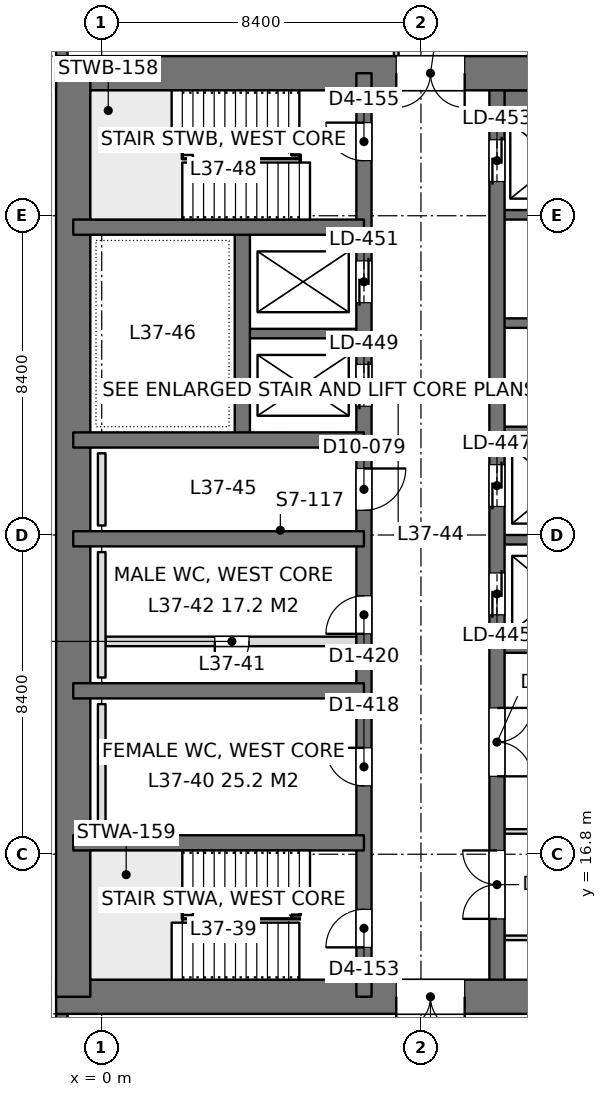
"""IFC4 building model, lengths in metres.
Left out: names, types, materials, properties, quantities, classifications, styles, units other than length and angle.
Written with IfcOpenShell. Run it as: python <this file> out.ifc"""

import sys

from ifc_helpers import new_model, si_unit, direction, frame, frame_2d, origin, place, context, subcontext, project, spatial, rectangle, extrude, element, fill, save


model = new_model("IFC4")
c1 = context("Model", 3, precision=1e-05, world=origin(), true_north=direction((0.0, 1.0)))
c2 = subcontext(c1, "Body", "Model", "MODEL_VIEW")
j1 = project(units=[si_unit("LENGTHUNIT", "METRE"), si_unit("PLANEANGLEUNIT", "RADIAN")], contexts=[c1])
p1 = place(None, origin())
s1 = spatial("IfcSite", under=j1, at=p1, CompositionType="ELEMENT")
p2 = place(p1, origin())
s2 = spatial("IfcBuilding", under=s1, at=p2, CompositionType="ELEMENT")
p3 = place(p2, frame((0.0, 0.0, 163.8)))
s3 = spatial("IfcBuildingStorey", under=s2, at=p3, CompositionType="ELEMENT", Elevation=163.8)
p4 = place(p3, frame((-1.2, 13.05, 0.0), z_axis=(0.0, 0.0, 1.0), x_axis=(1.0, 0.0, 0.0)))
e1 = element("IfcWall", 1, at=p4, inside=s3, PredefinedType="SHEAR", context=c2, shape_type="SweptSolid", body=[
    extrude(rectangle(XDim=18.0, YDim=0.9, at=frame_2d((9.0, 0.0))), origin(), (0.0, 0.0, 1.0), 4.2),
])
p5 = place(p4, frame((8.95, 0.0, 0.0)))
e2 = element("IfcOpeningElement", 2, at=p5, cuts=e1, PredefinedType="OPENING", context=c2, shape_type="SweptSolid", body=[
    extrude(rectangle(XDim=1.8, YDim=2.4, at=frame_2d((0.9, 1.2))), frame((0.0, 0.46, 0.0), z_axis=(0.0, -1.0, 0.0), x_axis=(1.0, 0.0, 0.0)), (0.0, 0.0, 1.0), 0.92),
])
p6 = place(p3, frame((-1.2, 37.35, 0.0), z_axis=(0.0, 0.0, 1.0), x_axis=(1.0, 0.0, 0.0)))
e3 = element("IfcWall", 3, at=p6, inside=s3, PredefinedType="SHEAR", context=c2, shape_type="SweptSolid", body=[
    extrude(rectangle(XDim=18.0, YDim=0.9, at=frame_2d((9.0, 0.0))), origin(), (0.0, 0.0, 1.0), 4.2),
])
p7 = place(p6, frame((8.95, 0.0, 0.0)))
e4 = element("IfcOpeningElement", 4, at=p7, cuts=e3, PredefinedType="OPENING", context=c2, shape_type="SweptSolid", body=[
    extrude(rectangle(XDim=1.8, YDim=2.4, at=frame_2d((0.9, 1.2))), frame((0.0, 0.46, 0.0), z_axis=(0.0, -1.0, 0.0), x_axis=(1.0, 0.0, 0.0)), (0.0, 0.0, 1.0), 0.92),
])
p8 = place(p3, frame((-0.75, 13.05, 0.0), z_axis=(0.0, 0.0, 1.0), x_axis=(0.0, 1.0, 0.0)))
e5 = element("IfcWall", 5, at=p8, inside=s3, PredefinedType="SHEAR", context=c2, shape_type="SweptSolid", body=[
    extrude(rectangle(XDim=24.3, YDim=0.9, at=frame_2d((12.15, 0.0))), origin(), (0.0, 0.0, 1.0), 4.2),
])
p9 = place(p3, frame((6.9, 13.05, 0.0), z_axis=(0.0, 0.0, 1.0), x_axis=(0.0, 1.0, 0.0)))
e6 = element("IfcWall", 6, at=p9, inside=s3, PredefinedType="SHEAR", context=c2, shape_type="SweptSolid", body=[
    extrude(rectangle(XDim=24.3, YDim=0.4, at=frame_2d((12.15, 0.0))), origin(), (0.0, 0.0, 1.0), 4.2),
])
p10 = place(p9, frame((1.3, 0.0, 0.0)))
e7 = element("IfcOpeningElement", 7, at=p10, cuts=e6, PredefinedType="OPENING", context=c2, shape_type="SweptSolid", body=[
    extrude(rectangle(XDim=1.0, YDim=2.2, at=frame_2d((0.5, 1.1))), frame((0.0, 0.21, 0.0), z_axis=(0.0, -1.0, 0.0), x_axis=(1.0, 0.0, 0.0)), (0.0, 0.0, 1.0), 0.42),
])
p11 = place(p9, frame((22.0, 0.0, 0.0)))
e8 = element("IfcOpeningElement", 8, at=p11, cuts=e6, PredefinedType="OPENING", context=c2, shape_type="SweptSolid", body=[
    extrude(rectangle(XDim=1.0, YDim=2.2, at=frame_2d((0.5, 1.1))), frame((0.0, 0.21, 0.0), z_axis=(0.0, -1.0, 0.0), x_axis=(1.0, 0.0, 0.0)), (0.0, 0.0, 1.0), 0.42),
])
p12 = place(p9, frame((5.55, 0.0, 0.0)))
e9 = element("IfcOpeningElement", 9, at=p12, cuts=e6, PredefinedType="OPENING", context=c2, shape_type="SweptSolid", body=[
    extrude(rectangle(XDim=1.0, YDim=2.2, at=frame_2d((0.5, 1.1))), frame((0.0, 0.21, 0.0), z_axis=(0.0, -1.0, 0.0), x_axis=(1.0, 0.0, 0.0)), (0.0, 0.0, 1.0), 0.42),
])
p13 = place(p9, frame((9.55, 0.0, 0.0)))
e10 = element("IfcOpeningElement", 10, at=p13, cuts=e6, PredefinedType="OPENING", context=c2, shape_type="SweptSolid", body=[
    extrude(rectangle(XDim=1.0, YDim=2.2, at=frame_2d((0.5, 1.1))), frame((0.0, 0.21, 0.0), z_axis=(0.0, -1.0, 0.0), x_axis=(1.0, 0.0, 0.0)), (0.0, 0.0, 1.0), 0.42),
])
p14 = place(p9, frame((12.8, 0.0, 0.0)))
e11 = element("IfcOpeningElement", 11, at=p14, cuts=e6, PredefinedType="OPENING", context=c2, shape_type="SweptSolid", body=[
    extrude(rectangle(XDim=1.1, YDim=2.2, at=frame_2d((0.55, 1.1))), frame((0.0, 0.21, 0.0), z_axis=(0.0, -1.0, 0.0), x_axis=(1.0, 0.0, 0.0)), (0.0, 0.0, 1.0), 0.42),
])
p15 = place(p9, frame((15.538, 0.0, 0.0)))
e12 = element("IfcOpeningElement", 12, at=p15, cuts=e6, PredefinedType="OPENING", context=c2, shape_type="SweptSolid", body=[
    extrude(rectangle(XDim=1.1, YDim=2.2, at=frame_2d((0.55, 1.1))), frame((0.0, 0.21, 0.0), z_axis=(0.0, -1.0, 0.0), x_axis=(1.0, 0.0, 0.0)), (0.0, 0.0, 1.0), 0.42),
])
p16 = place(p9, frame((18.262, 0.0, 0.0)))
e13 = element("IfcOpeningElement", 13, at=p16, cuts=e6, PredefinedType="OPENING", context=c2, shape_type="SweptSolid", body=[
    extrude(rectangle(XDim=1.1, YDim=2.2, at=frame_2d((0.55, 1.1))), frame((0.0, 0.21, 0.0), z_axis=(0.0, -1.0, 0.0), x_axis=(1.0, 0.0, 0.0)), (0.0, 0.0, 1.0), 0.42),
])
p17 = place(p3, frame((10.4, 13.05, 0.0), z_axis=(0.0, 0.0, 1.0), x_axis=(0.0, 1.0, 0.0)))
e14 = element("IfcWall", 14, at=p17, inside=s3, PredefinedType="SHEAR", context=c2, shape_type="SweptSolid", body=[
    extrude(rectangle(XDim=24.3, YDim=0.4, at=frame_2d((12.15, 0.0))), origin(), (0.0, 0.0, 1.0), 4.2),
])
p18 = place(p17, frame((10.05, 0.0, 0.0)))
e15 = element("IfcOpeningElement", 15, at=p18, cuts=e14, PredefinedType="OPENING", context=c2, shape_type="SweptSolid", body=[
    extrude(rectangle(XDim=1.1, YDim=2.2, at=frame_2d((0.55, 1.1))), frame((0.0, 0.21, 0.0), z_axis=(0.0, -1.0, 0.0), x_axis=(1.0, 0.0, 0.0)), (0.0, 0.0, 1.0), 0.42),
])
p19 = place(p17, frame((12.9, 0.0, 0.0)))
e16 = element("IfcOpeningElement", 16, at=p19, cuts=e14, PredefinedType="OPENING", context=c2, shape_type="SweptSolid", body=[
    extrude(rectangle(XDim=1.1, YDim=2.2, at=frame_2d((0.55, 1.1))), frame((0.0, 0.21, 0.0), z_axis=(0.0, -1.0, 0.0), x_axis=(1.0, 0.0, 0.0)), (0.0, 0.0, 1.0), 0.42),
])
p20 = place(p17, frame((21.45, 0.0, 0.0)))
e17 = element("IfcOpeningElement", 17, at=p20, cuts=e14, PredefinedType="OPENING", context=c2, shape_type="SweptSolid", body=[
    extrude(rectangle(XDim=1.1, YDim=2.2, at=frame_2d((0.55, 1.1))), frame((0.0, 0.21, 0.0), z_axis=(0.0, -1.0, 0.0), x_axis=(1.0, 0.0, 0.0)), (0.0, 0.0, 1.0), 0.42),
])
p21 = place(p17, frame((2.05, 0.0, 0.0)))
e18 = element("IfcOpeningElement", 18, at=p21, cuts=e14, PredefinedType="OPENING", context=c2, shape_type="SweptSolid", body=[
    extrude(rectangle(XDim=1.8, YDim=2.4, at=frame_2d((0.9, 1.2))), frame((0.0, 0.21, 0.0), z_axis=(0.0, -1.0, 0.0), x_axis=(1.0, 0.0, 0.0)), (0.0, 0.0, 1.0), 0.42),
])
p22 = place(p17, frame((5.8, 0.0, 0.0)))
e19 = element("IfcOpeningElement", 19, at=p22, cuts=e14, PredefinedType="OPENING", context=c2, shape_type="SweptSolid", body=[
    extrude(rectangle(XDim=1.8, YDim=2.4, at=frame_2d((0.9, 1.2))), frame((0.0, 0.21, 0.0), z_axis=(0.0, -1.0, 0.0), x_axis=(1.0, 0.0, 0.0)), (0.0, 0.0, 1.0), 0.42),
])
for number, where, z_axis, x_axis in (
    (20, (-0.75, 17.1, 0.0), (0.0, 0.0, 1.0), (1.0, 0.0, 0.0)),
    (21, (-0.75, 21.1, 0.0), (0.0, 0.0, 1.0), (1.0, 0.0, 0.0)),
    (22, (-0.75, 25.1, 0.0), (0.0, 0.0, 1.0), (1.0, 0.0, 0.0)),
    (23, (-0.75, 27.7, 0.0), (0.0, 0.0, 1.0), (1.0, 0.0, 0.0)),
    (24, (-0.75, 33.3, 0.0), (0.0, 0.0, 1.0), (1.0, 0.0, 0.0)),
):
    element("IfcWall", number, at=place(p3, frame(where, z_axis=z_axis, x_axis=x_axis)), inside=s3, PredefinedType="SHEAR", context=c2, shape_type="SweptSolid", body=[
        extrude(rectangle(XDim=7.65, YDim=0.4, at=frame_2d((3.825, 0.0))), origin(), (0.0, 0.0, 1.0), 4.2),
    ])
p23 = place(p3, frame((3.7, 27.7, 0.0), z_axis=(0.0, 0.0, 1.0), x_axis=(0.0, 1.0, 0.0)))
e25 = element("IfcWall", 25, at=p23, inside=s3, PredefinedType="SHEAR", context=c2, shape_type="SweptSolid", body=[
    extrude(rectangle(XDim=5.6, YDim=0.4, at=frame_2d((2.8, 0.0))), origin(), (0.0, 0.0, 1.0), 4.2),
])
p24 = place(p3, frame((3.7, 30.5, 0.0), z_axis=(0.0, 0.0, 1.0), x_axis=(1.0, 0.0, 0.0)))
e26 = element("IfcWall", 26, at=p24, inside=s3, PredefinedType="SHEAR", context=c2, shape_type="SweptSolid", body=[
    extrude(rectangle(XDim=3.2, YDim=0.25, at=frame_2d((1.6, 0.0))), origin(), (0.0, 0.0, 1.0), 4.2),
])
p25 = place(p3, frame((10.4, 22.225, 0.0), z_axis=(0.0, 0.0, 1.0), x_axis=(1.0, 0.0, 0.0)))
e27 = element("IfcWall", 27, at=p25, inside=s3, PredefinedType="SHEAR", context=c2, shape_type="SweptSolid", body=[
    extrude(rectangle(XDim=5.95, YDim=0.25, at=frame_2d((2.975, 0.0))), origin(), (0.0, 0.0, 1.0), 4.2),
])
for number, where, z_axis, x_axis in (
    (28, (10.4, 25.075, 0.0), (0.0, 0.0, 1.0), (1.0, 0.0, 0.0)),
    (29, (10.4, 27.925, 0.0), (0.0, 0.0, 1.0), (1.0, 0.0, 0.0)),
    (30, (10.4, 30.775, 0.0), (0.0, 0.0, 1.0), (1.0, 0.0, 0.0)),
    (31, (10.4, 33.625, 0.0), (0.0, 0.0, 1.0), (1.0, 0.0, 0.0)),
):
    element("IfcWall", number, at=place(p3, frame(where, z_axis=z_axis, x_axis=x_axis)), inside=s3, PredefinedType="SHEAR", context=c2, shape_type="SweptSolid", body=[
        extrude(rectangle(XDim=3.2, YDim=0.25, at=frame_2d((1.6, 0.0))), origin(), (0.0, 0.0, 1.0), 4.2),
    ])
p26 = place(p3, frame((10.4, 36.625, 0.0), z_axis=(0.0, 0.0, 1.0), x_axis=(1.0, 0.0, 0.0)))
e32 = element("IfcWall", 32, at=p26, inside=s3, PredefinedType="SHEAR", context=c2, shape_type="SweptSolid", body=[
    extrude(rectangle(XDim=3.2, YDim=0.55, at=frame_2d((1.6, 0.0))), origin(), (0.0, 0.0, 1.0), 4.2),
])
p27 = place(p3, frame((-1.05, 8.4, 0.0), z_axis=(0.0, 0.0, 1.0), x_axis=(0.0, 1.0, 0.0)))
e33 = element("IfcWall", 33, at=p27, inside=s3, PredefinedType="SOLIDWALL", context=c2, shape_type="SweptSolid", body=[
    extrude(rectangle(XDim=4.2, YDim=0.3, at=frame_2d((2.1, 0.0))), origin(), (0.0, 0.0, 1.0), 4.0),
])
p28 = place(p27, frame((0.9, 0.0, 0.9)))
e34 = element("IfcOpeningElement", 34, at=p28, cuts=e33, PredefinedType="OPENING", context=c2, shape_type="SweptSolid", body=[
    extrude(rectangle(XDim=2.4, YDim=1.9, at=frame_2d((1.2, 0.95))), frame((0.0, 0.16, 0.0), z_axis=(0.0, -1.0, 0.0), x_axis=(1.0, 0.0, 0.0)), (0.0, 0.0, 1.0), 0.32),
])
p29 = place(p3, frame((-1.05, 37.8, 0.0), z_axis=(0.0, 0.0, 1.0), x_axis=(0.0, 1.0, 0.0)))
e35 = element("IfcWall", 35, at=p29, inside=s3, PredefinedType="SOLIDWALL", context=c2, shape_type="SweptSolid", body=[
    extrude(rectangle(XDim=4.2, YDim=0.3, at=frame_2d((2.1, 0.0))), origin(), (0.0, 0.0, 1.0), 4.0),
])
p30 = place(p29, frame((0.9, 0.0, 0.9)))
e36 = element("IfcOpeningElement", 36, at=p30, cuts=e35, PredefinedType="OPENING", context=c2, shape_type="SweptSolid", body=[
    extrude(rectangle(XDim=2.4, YDim=1.9, at=frame_2d((1.2, 0.95))), frame((0.0, 0.16, 0.0), z_axis=(0.0, -1.0, 0.0), x_axis=(1.0, 0.0, 0.0)), (0.0, 0.0, 1.0), 0.32),
])
p31 = place(p3, frame((10.598, 17.4, 0.0), z_axis=(0.0, 0.0, 1.0), x_axis=(1.0, 0.0, 0.0)))
e37 = element("IfcWall", 37, at=p31, inside=s3, PredefinedType="PARTITIONING", context=c2, shape_type="SweptSolid", body=[
    extrude(rectangle(XDim=5.904, YDim=0.12, at=frame_2d((2.952, 0.0))), origin(), (0.0, 0.0, 1.0), 3.3),
])
p32 = place(p3, frame((10.598, 14.6, 0.0), z_axis=(0.0, 0.0, 1.0), x_axis=(1.0, 0.0, 0.0)))
e38 = element("IfcWall", 38, at=p32, inside=s3, PredefinedType="PARTITIONING", context=c2, shape_type="SweptSolid", body=[
    extrude(rectangle(XDim=6.204, YDim=0.12, at=frame_2d((3.102, 0.0))), origin(), (0.0, 0.0, 1.0), 3.3),
])
p33 = place(p3, frame((7.75, 37.8, 0.0), z_axis=(0.0, 0.0, 1.0), x_axis=(0.0, 1.0, 0.0)))
e39 = element("IfcWall", 39, at=p33, inside=s3, PredefinedType="PARTITIONING", context=c2, shape_type="SweptSolid", body=[
    extrude(rectangle(XDim=2.0, YDim=0.12, at=frame_2d((1.0, 0.0))), origin(), (0.0, 0.0, 1.0), 4.0),
])
p34 = place(p3, frame((0.1, 22.4, 0.0), z_axis=(0.0, 0.0, 1.0), x_axis=(1.0, 0.0, 0.0)))
e40 = element("IfcWall", 40, at=p34, inside=s3, PredefinedType="PARTITIONING", context=c2, shape_type="SweptSolid", body=[
    extrude(rectangle(XDim=6.6, YDim=0.25, at=frame_2d((3.3, 0.0))), origin(), (0.0, 0.0, 1.0), 4.0),
])
p35 = place(p34, frame((2.875, 0.0, 0.0)))
e41 = element("IfcOpeningElement", 41, at=p35, cuts=e40, PredefinedType="OPENING", context=c2, shape_type="SweptSolid", body=[
    extrude(rectangle(XDim=0.9, YDim=2.2, at=frame_2d((0.45, 1.1))), frame((0.0, 0.135, 0.0), z_axis=(0.0, -1.0, 0.0), x_axis=(1.0, 0.0, 0.0)), (0.0, 0.0, 1.0), 0.27),
])
for number, where, z_axis, x_axis in (
    (42, (0.0, 17.45, 0.0), (0.0, 0.0, 1.0), (0.0, 1.0, 0.0)),
    (43, (0.0, 21.45, 0.0), (0.0, 0.0, 1.0), (0.0, 1.0, 0.0)),
):
    element("IfcWall", number, at=place(p3, frame(where, z_axis=z_axis, x_axis=x_axis)), inside=s3, PredefinedType="PLUMBINGWALL", context=c2, shape_type="SweptSolid", body=[
        extrude(rectangle(XDim=3.3, YDim=0.2, at=frame_2d((1.65, 0.0))), origin(), (0.0, 0.0, 1.0), 1.2),
    ])
p36 = place(p3, frame((0.0, 25.45, 0.0), z_axis=(0.0, 0.0, 1.0), x_axis=(0.0, 1.0, 0.0)))
e44 = element("IfcWall", 44, at=p36, inside=s3, PredefinedType="PLUMBINGWALL", context=c2, shape_type="SweptSolid", body=[
    extrude(rectangle(XDim=1.9, YDim=0.2, at=frame_2d((0.95, 0.0))), origin(), (0.0, 0.0, 1.0), 1.2),
])
p37 = place(p5, frame((1.8, 0.0, 0.0), z_axis=(0.0, 0.0, 1.0), x_axis=(-1.0, 0.0, 0.0)))
e45 = element("IfcDoor", 45, at=p37, inside=s3, OperationType="DOUBLE_DOOR_SINGLE_SWING", PredefinedType="DOOR", context=c2, shape_type="SweptSolid", body=[
    extrude(rectangle(XDim=1.8, YDim=2.4, at=frame_2d((0.9, 1.2))), frame((0.0, 0.025, 0.0), z_axis=(0.0, -1.0, 0.0), x_axis=(1.0, 0.0, 0.0)), (0.0, 0.0, 1.0), 0.05),
])
fill(e2, e45)
p38 = place(p7, frame((1.8, 0.0, 0.0), z_axis=(0.0, 0.0, 1.0), x_axis=(-1.0, 0.0, 0.0)))
e46 = element("IfcDoor", 46, at=p38, inside=s3, OperationType="DOUBLE_DOOR_SINGLE_SWING", PredefinedType="DOOR", context=c2, shape_type="SweptSolid", body=[
    extrude(rectangle(XDim=1.8, YDim=2.4, at=frame_2d((0.9, 1.2))), frame((0.0, 0.025, 0.0), z_axis=(0.0, -1.0, 0.0), x_axis=(1.0, 0.0, 0.0)), (0.0, 0.0, 1.0), 0.05),
])
fill(e4, e46)
p39 = place(p10, origin())
e47 = element("IfcDoor", 47, at=p39, inside=s3, OperationType="SINGLE_SWING_LEFT", PredefinedType="DOOR", context=c2, shape_type="SweptSolid", body=[
    extrude(rectangle(XDim=1.0, YDim=2.2, at=frame_2d((0.5, 1.1))), frame((0.0, 0.025, 0.0), z_axis=(0.0, -1.0, 0.0), x_axis=(1.0, 0.0, 0.0)), (0.0, 0.0, 1.0), 0.05),
])
fill(e7, e47)
p40 = place(p11, origin())
e48 = element("IfcDoor", 48, at=p40, inside=s3, OperationType="SINGLE_SWING_RIGHT", PredefinedType="DOOR", context=c2, shape_type="SweptSolid", body=[
    extrude(rectangle(XDim=1.0, YDim=2.2, at=frame_2d((0.5, 1.1))), frame((0.0, 0.025, 0.0), z_axis=(0.0, -1.0, 0.0), x_axis=(1.0, 0.0, 0.0)), (0.0, 0.0, 1.0), 0.05),
])
fill(e8, e48)
p41 = place(p12, origin())
e49 = element("IfcDoor", 49, at=p41, inside=s3, OperationType="SINGLE_SWING_RIGHT", PredefinedType="DOOR", context=c2, shape_type="SweptSolid", body=[
    extrude(rectangle(XDim=1.0, YDim=2.2, at=frame_2d((0.5, 1.1))), frame((0.0, 0.025, 0.0), z_axis=(0.0, -1.0, 0.0), x_axis=(1.0, 0.0, 0.0)), (0.0, 0.0, 1.0), 0.05),
])
fill(e9, e49)
p42 = place(p13, origin())
e50 = element("IfcDoor", 50, at=p42, inside=s3, OperationType="SINGLE_SWING_LEFT", PredefinedType="DOOR", context=c2, shape_type="SweptSolid", body=[
    extrude(rectangle(XDim=1.0, YDim=2.2, at=frame_2d((0.5, 1.1))), frame((0.0, 0.025, 0.0), z_axis=(0.0, -1.0, 0.0), x_axis=(1.0, 0.0, 0.0)), (0.0, 0.0, 1.0), 0.05),
])
fill(e10, e50)
p43 = place(p14, frame((1.1, 0.0, 0.0), z_axis=(0.0, 0.0, 1.0), x_axis=(-1.0, 0.0, 0.0)))
e51 = element("IfcDoor", 51, at=p43, inside=s3, OperationType="SINGLE_SWING_LEFT", PredefinedType="DOOR", context=c2, shape_type="SweptSolid", body=[
    extrude(rectangle(XDim=1.1, YDim=2.2, at=frame_2d((0.55, 1.1))), frame((0.0, 0.025, 0.0), z_axis=(0.0, -1.0, 0.0), x_axis=(1.0, 0.0, 0.0)), (0.0, 0.0, 1.0), 0.05),
])
fill(e11, e51)
p44 = place(p18, origin())
e52 = element("IfcDoor", 52, at=p44, inside=s3, OperationType="DOUBLE_DOOR_SLIDING", PredefinedType="DOOR", context=c2, shape_type="SweptSolid", body=[
    extrude(rectangle(XDim=1.1, YDim=2.2, at=frame_2d((0.55, 1.1))), frame((0.0, 0.025, 0.0), z_axis=(0.0, -1.0, 0.0), x_axis=(1.0, 0.0, 0.0)), (0.0, 0.0, 1.0), 0.05),
])
fill(e15, e52)
p45 = place(p19, origin())
e53 = element("IfcDoor", 53, at=p45, inside=s3, OperationType="DOUBLE_DOOR_SLIDING", PredefinedType="DOOR", context=c2, shape_type="SweptSolid", body=[
    extrude(rectangle(XDim=1.1, YDim=2.2, at=frame_2d((0.55, 1.1))), frame((0.0, 0.025, 0.0), z_axis=(0.0, -1.0, 0.0), x_axis=(1.0, 0.0, 0.0)), (0.0, 0.0, 1.0), 0.05),
])
fill(e16, e53)
p46 = place(p20, origin())
e54 = element("IfcDoor", 54, at=p46, inside=s3, OperationType="DOUBLE_DOOR_SLIDING", PredefinedType="DOOR", context=c2, shape_type="SweptSolid", body=[
    extrude(rectangle(XDim=1.1, YDim=2.2, at=frame_2d((0.55, 1.1))), frame((0.0, 0.025, 0.0), z_axis=(0.0, -1.0, 0.0), x_axis=(1.0, 0.0, 0.0)), (0.0, 0.0, 1.0), 0.05),
])
fill(e17, e54)
p47 = place(p15, origin())
e55 = element("IfcDoor", 55, at=p47, inside=s3, OperationType="DOUBLE_DOOR_SLIDING", PredefinedType="DOOR", context=c2, shape_type="SweptSolid", body=[
    extrude(rectangle(XDim=1.1, YDim=2.2, at=frame_2d((0.55, 1.1))), frame((0.0, 0.025, 0.0), z_axis=(0.0, -1.0, 0.0), x_axis=(1.0, 0.0, 0.0)), (0.0, 0.0, 1.0), 0.05),
])
fill(e12, e55)
p48 = place(p16, origin())
e56 = element("IfcDoor", 56, at=p48, inside=s3, OperationType="DOUBLE_DOOR_SLIDING", PredefinedType="DOOR", context=c2, shape_type="SweptSolid", body=[
    extrude(rectangle(XDim=1.1, YDim=2.2, at=frame_2d((0.55, 1.1))), frame((0.0, 0.025, 0.0), z_axis=(0.0, -1.0, 0.0), x_axis=(1.0, 0.0, 0.0)), (0.0, 0.0, 1.0), 0.05),
])
fill(e13, e56)
p49 = place(p21, origin())
e57 = element("IfcDoor", 57, at=p49, inside=s3, OperationType="DOUBLE_DOOR_SINGLE_SWING", PredefinedType="DOOR", context=c2, shape_type="SweptSolid", body=[
    extrude(rectangle(XDim=1.8, YDim=2.4, at=frame_2d((0.9, 1.2))), frame((0.0, 0.025, 0.0), z_axis=(0.0, -1.0, 0.0), x_axis=(1.0, 0.0, 0.0)), (0.0, 0.0, 1.0), 0.05),
])
fill(e18, e57)
p50 = place(p22, frame((1.8, 0.0, 0.0), z_axis=(0.0, 0.0, 1.0), x_axis=(-1.0, 0.0, 0.0)))
e58 = element("IfcDoor", 58, at=p50, inside=s3, OperationType="DOUBLE_DOOR_SINGLE_SWING", PredefinedType="DOOR", context=c2, shape_type="SweptSolid", body=[
    extrude(rectangle(XDim=1.8, YDim=2.4, at=frame_2d((0.9, 1.2))), frame((0.0, 0.025, 0.0), z_axis=(0.0, -1.0, 0.0), x_axis=(1.0, 0.0, 0.0)), (0.0, 0.0, 1.0), 0.05),
])
fill(e19, e58)
p51 = place(p35, frame((0.9, 0.0, 0.0), z_axis=(0.0, 0.0, 1.0), x_axis=(-1.0, 0.0, 0.0)))
e59 = element("IfcDoor", 59, at=p51, inside=s3, OperationType="SINGLE_SWING_RIGHT", PredefinedType="DOOR", context=c2, shape_type="SweptSolid", body=[
    extrude(rectangle(XDim=0.9, YDim=2.2, at=frame_2d((0.45, 1.1))), frame((0.0, 0.025, 0.0), z_axis=(0.0, -1.0, 0.0), x_axis=(1.0, 0.0, 0.0)), (0.0, 0.0, 1.0), 0.05),
])
fill(e41, e59)
save(model, sys.argv[1])
